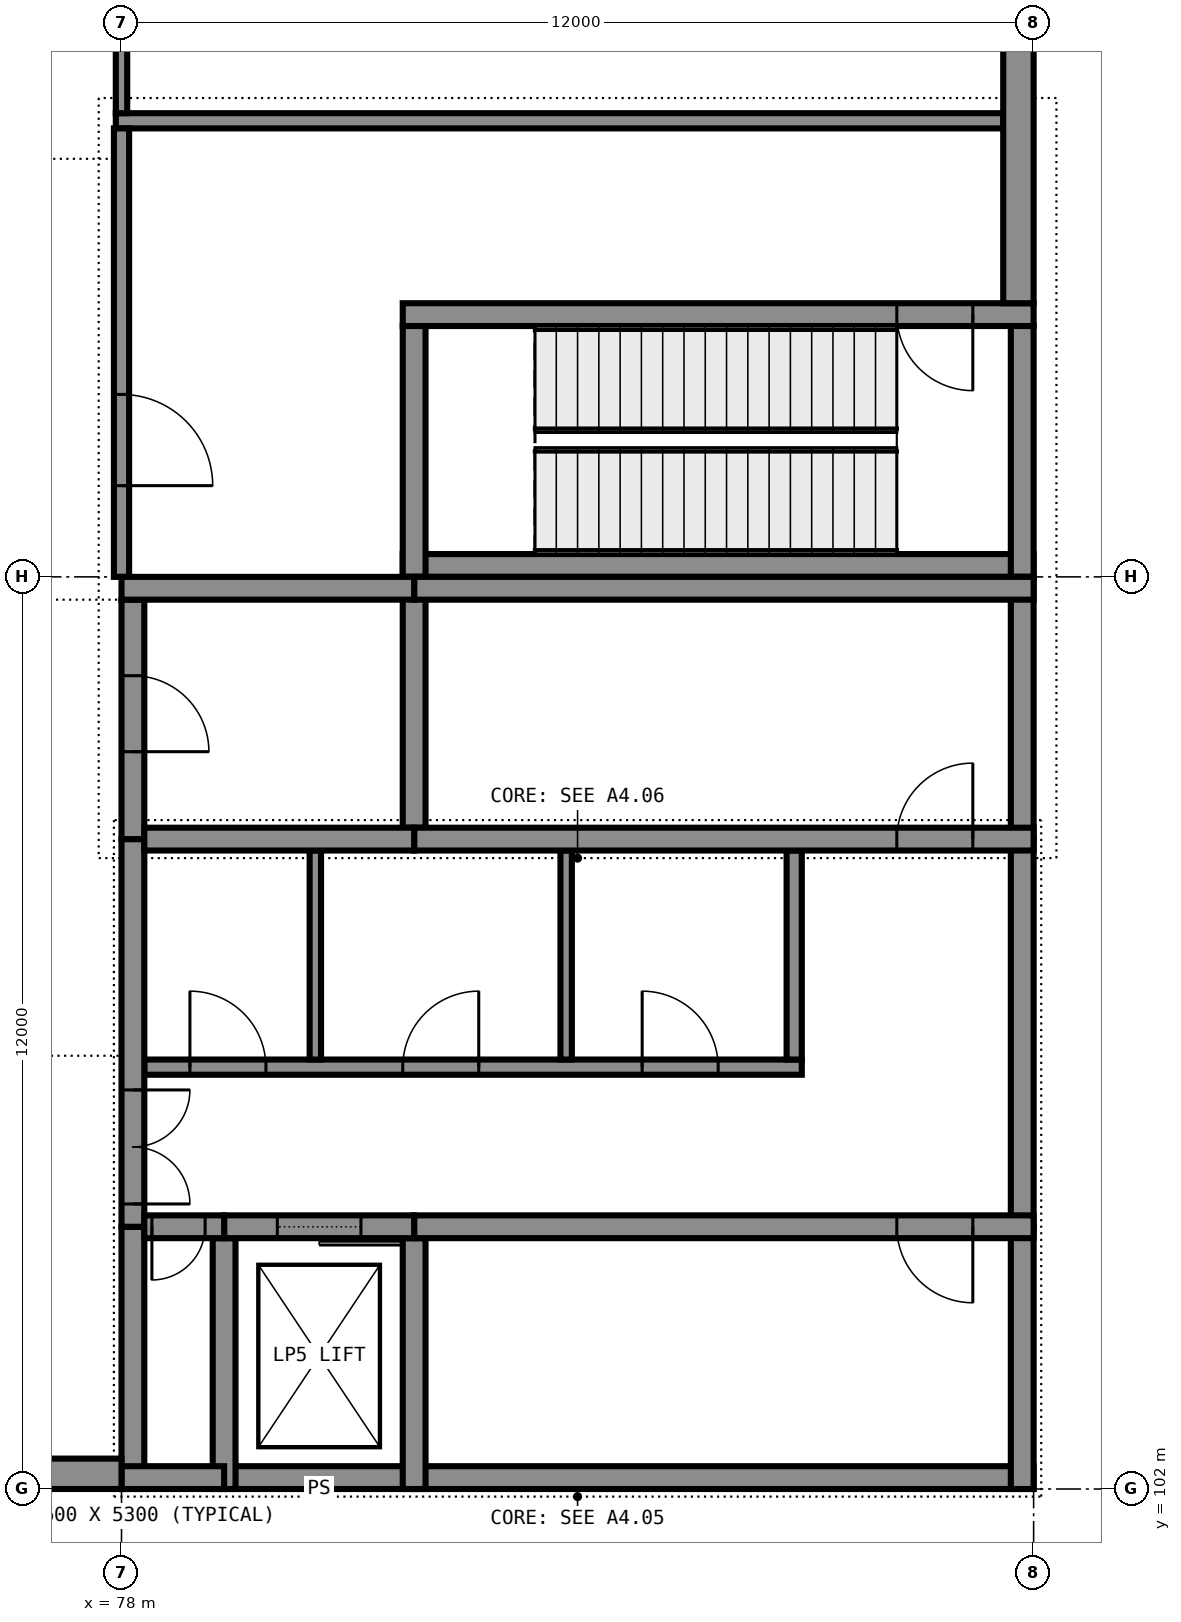
"""IFC4 building model, lengths in metres.
Left out: names, types, materials, properties, quantities, classifications, styles, units other than length and angle.
Written with IfcOpenShell. Run it as: python <this file> out.ifc"""

import sys

from ifc_helpers import new_model, si_unit, direction, frame, frame_2d, origin, place, context, subcontext, project, spatial, rectangle, extrude, element, fill, save


model = new_model("IFC4")
c1 = context("Model", 3, precision=1e-05, world=origin(), true_north=direction((0.0, 1.0)))
c2 = subcontext(c1, "Body", "Model", "MODEL_VIEW")
j1 = project(units=[si_unit("LENGTHUNIT", "METRE"), si_unit("PLANEANGLEUNIT", "RADIAN")], contexts=[c1])
p1 = place(None, origin())
s1 = spatial("IfcSite", under=j1, at=p1, CompositionType="ELEMENT")
p2 = place(p1, origin())
s2 = spatial("IfcBuilding", under=s1, at=p2, CompositionType="ELEMENT")
p3 = place(p2, frame((0.0, 0.0, -6.0)))
s3 = spatial("IfcBuildingStorey", under=s2, at=p3, CompositionType="ELEMENT", Elevation=-6.0)
p4 = place(p3, frame((90.0, 114.15, 0.0), z_axis=(0.0, 0.0, 1.0), x_axis=(-1.0, 0.0, 0.0)))
e1 = element("IfcWall", 1, at=p4, inside=s3, PredefinedType="SHEAR", context=c2, shape_type="SweptSolid", body=[
    extrude(rectangle(XDim=8.3, YDim=0.3, at=frame_2d((4.15, 0.0))), origin(), (0.0, 0.0, 1.0), 5.7),
])
p5 = place(p3, frame((90.0, 117.45, 0.0), z_axis=(0.0, 0.0, 1.0), x_axis=(-1.0, 0.0, 0.0)))
e2 = element("IfcWall", 2, at=p5, inside=s3, PredefinedType="SHEAR", context=c2, shape_type="SweptSolid", body=[
    extrude(rectangle(XDim=8.3, YDim=0.3, at=frame_2d((4.15, 0.0))), origin(), (0.0, 0.0, 1.0), 5.7),
])
p6 = place(p5, frame((0.8, 0.0, 0.0)))
e3 = element("IfcOpeningElement", 3, at=p6, cuts=e2, PredefinedType="OPENING", context=c2, shape_type="SweptSolid", body=[
    extrude(rectangle(XDim=1.0, YDim=2.1, at=frame_2d((0.5, 1.05))), frame((0.0, 0.16, 0.0), z_axis=(0.0, -1.0, 0.0), x_axis=(1.0, 0.0, 0.0)), (0.0, 0.0, 1.0), 0.32),
])
for number, where, z_axis, x_axis in (
    (4, (89.85, 114.0, 0.0), (0.0, 0.0, 1.0), (0.0, 1.0, 0.0)),
    (5, (81.85, 114.0, 0.0), (0.0, 0.0, 1.0), (0.0, 1.0, 0.0)),
):
    element("IfcWall", number, at=place(p3, frame(where, z_axis=z_axis, x_axis=x_axis)), inside=s3, PredefinedType="SHEAR", context=c2, shape_type="SweptSolid", body=[
        extrude(rectangle(XDim=3.3, YDim=0.3, at=frame_2d((1.65, 0.0))), origin(), (0.0, 0.0, 1.0), 5.7),
    ])
p7 = place(p3, frame((90.0, 102.15, 0.0), z_axis=(0.0, 0.0, 1.0), x_axis=(-1.0, 0.0, 0.0)))
e6 = element("IfcWall", 6, at=p7, inside=s3, PredefinedType="SHEAR", context=c2, shape_type="SweptSolid", body=[
    extrude(rectangle(XDim=8.15, YDim=0.3, at=frame_2d((4.075, 0.0))), origin(), (0.0, 0.0, 1.0), 5.7),
])
p8 = place(p3, frame((81.85, 102.15, 0.0), z_axis=(0.0, 0.0, 1.0), x_axis=(-1.0, 0.0, 0.0)))
e7 = element("IfcWall", 7, at=p8, inside=s3, PredefinedType="SHEAR", context=c2, shape_type="SweptSolid", body=[
    extrude(rectangle(XDim=2.5, YDim=0.3, at=frame_2d((1.25, 0.0))), origin(), (0.0, 0.0, 1.0), 5.7),
])
p9 = place(p3, frame((79.35, 102.15, 0.0), z_axis=(0.0, 0.0, 1.0), x_axis=(-1.0, 0.0, 0.0)))
e8 = element("IfcWall", 8, at=p9, inside=s3, PredefinedType="SHEAR", context=c2, shape_type="SweptSolid", body=[
    extrude(rectangle(XDim=1.35, YDim=0.3, at=frame_2d((0.675, 0.0))), origin(), (0.0, 0.0, 1.0), 5.7),
])
p10 = place(p3, frame((90.0, 113.85, 0.0), z_axis=(0.0, 0.0, 1.0), x_axis=(-1.0, 0.0, 0.0)))
e9 = element("IfcWall", 9, at=p10, inside=s3, PredefinedType="SHEAR", context=c2, shape_type="SweptSolid", body=[
    extrude(rectangle(XDim=8.15, YDim=0.3, at=frame_2d((4.075, 0.0))), origin(), (0.0, 0.0, 1.0), 5.7),
])
p11 = place(p3, frame((81.85, 113.85, 0.0), z_axis=(0.0, 0.0, 1.0), x_axis=(-1.0, 0.0, 0.0)))
e10 = element("IfcWall", 10, at=p11, inside=s3, PredefinedType="SHEAR", context=c2, shape_type="SweptSolid", body=[
    extrude(rectangle(XDim=3.85, YDim=0.3, at=frame_2d((1.925, 0.0))), origin(), (0.0, 0.0, 1.0), 5.7),
])
p12 = place(p3, frame((90.0, 105.45, 0.0), z_axis=(0.0, 0.0, 1.0), x_axis=(-1.0, 0.0, 0.0)))
e11 = element("IfcWall", 11, at=p12, inside=s3, PredefinedType="SHEAR", context=c2, shape_type="SweptSolid", body=[
    extrude(rectangle(XDim=8.15, YDim=0.3, at=frame_2d((4.075, 0.0))), origin(), (0.0, 0.0, 1.0), 5.7),
])
p13 = place(p12, frame((0.8, 0.0, 0.0)))
e12 = element("IfcOpeningElement", 12, at=p13, cuts=e11, PredefinedType="OPENING", context=c2, shape_type="SweptSolid", body=[
    extrude(rectangle(XDim=1.0, YDim=2.1, at=frame_2d((0.5, 1.05))), frame((0.0, 0.16, 0.0), z_axis=(0.0, -1.0, 0.0), x_axis=(1.0, 0.0, 0.0)), (0.0, 0.0, 1.0), 0.32),
])
p14 = place(p3, frame((81.85, 105.45, 0.0), z_axis=(0.0, 0.0, 1.0), x_axis=(-1.0, 0.0, 0.0)))
e13 = element("IfcWall", 13, at=p14, inside=s3, PredefinedType="SHEAR", context=c2, shape_type="SweptSolid", body=[
    extrude(rectangle(XDim=2.5, YDim=0.3, at=frame_2d((1.25, 0.0))), origin(), (0.0, 0.0, 1.0), 5.7),
])
p15 = place(p14, frame((0.7, 0.0, 0.0)))
e14 = element("IfcOpeningElement", 14, at=p15, cuts=e13, PredefinedType="OPENING", context=c2, shape_type="SweptSolid", body=[
    extrude(rectangle(XDim=1.1, YDim=2.1, at=frame_2d((0.55, 1.05))), frame((0.0, 0.16, 0.0), z_axis=(0.0, -1.0, 0.0), x_axis=(1.0, 0.0, 0.0)), (0.0, 0.0, 1.0), 0.32),
])
p16 = place(p3, frame((79.35, 105.45, 0.0), z_axis=(0.0, 0.0, 1.0), x_axis=(-1.0, 0.0, 0.0)))
e15 = element("IfcWall", 15, at=p16, inside=s3, PredefinedType="SHEAR", context=c2, shape_type="SweptSolid", body=[
    extrude(rectangle(XDim=1.05, YDim=0.3, at=frame_2d((0.525, 0.0))), origin(), (0.0, 0.0, 1.0), 5.7),
])
p17 = place(p16, frame((0.25, 0.0, 0.0)))
e16 = element("IfcOpeningElement", 16, at=p17, cuts=e15, PredefinedType="OPENING", context=c2, shape_type="SweptSolid", body=[
    extrude(rectangle(XDim=0.7, YDim=2.1, at=frame_2d((0.35, 1.05))), frame((0.0, 0.16, 0.0), z_axis=(0.0, -1.0, 0.0), x_axis=(1.0, 0.0, 0.0)), (0.0, 0.0, 1.0), 0.32),
])
p18 = place(p3, frame((90.0, 110.55, 0.0), z_axis=(0.0, 0.0, 1.0), x_axis=(-1.0, 0.0, 0.0)))
e17 = element("IfcWall", 17, at=p18, inside=s3, PredefinedType="SHEAR", context=c2, shape_type="SweptSolid", body=[
    extrude(rectangle(XDim=8.15, YDim=0.3, at=frame_2d((4.075, 0.0))), origin(), (0.0, 0.0, 1.0), 5.7),
])
p19 = place(p18, frame((0.8, 0.0, 0.0)))
e18 = element("IfcOpeningElement", 18, at=p19, cuts=e17, PredefinedType="OPENING", context=c2, shape_type="SweptSolid", body=[
    extrude(rectangle(XDim=1.0, YDim=2.1, at=frame_2d((0.5, 1.05))), frame((0.0, 0.16, 0.0), z_axis=(0.0, -1.0, 0.0), x_axis=(1.0, 0.0, 0.0)), (0.0, 0.0, 1.0), 0.32),
])
p20 = place(p3, frame((81.85, 110.55, 0.0), z_axis=(0.0, 0.0, 1.0), x_axis=(-1.0, 0.0, 0.0)))
e19 = element("IfcWall", 19, at=p20, inside=s3, PredefinedType="SHEAR", context=c2, shape_type="SweptSolid", body=[
    extrude(rectangle(XDim=3.55, YDim=0.3, at=frame_2d((1.775, 0.0))), origin(), (0.0, 0.0, 1.0), 5.7),
])
p21 = place(p3, frame((89.85, 102.0, 0.0), z_axis=(0.0, 0.0, 1.0), x_axis=(0.0, 1.0, 0.0)))
e20 = element("IfcWall", 20, at=p21, inside=s3, PredefinedType="SHEAR", context=c2, shape_type="SweptSolid", body=[
    extrude(rectangle(XDim=3.45, YDim=0.3, at=frame_2d((1.725, 0.0))), origin(), (0.0, 0.0, 1.0), 5.7),
])
p22 = place(p3, frame((89.85, 105.45, 0.0), z_axis=(0.0, 0.0, 1.0), x_axis=(0.0, 1.0, 0.0)))
e21 = element("IfcWall", 21, at=p22, inside=s3, PredefinedType="SHEAR", context=c2, shape_type="SweptSolid", body=[
    extrude(rectangle(XDim=5.1, YDim=0.3, at=frame_2d((2.55, 0.0))), origin(), (0.0, 0.0, 1.0), 5.7),
])
for number, where, z_axis, x_axis in (
    (22, (89.85, 110.55, 0.0), (0.0, 0.0, 1.0), (0.0, 1.0, 0.0)),
    (23, (78.15, 102.0, 0.0), (0.0, 0.0, 1.0), (0.0, 1.0, 0.0)),
):
    element("IfcWall", number, at=place(p3, frame(where, z_axis=z_axis, x_axis=x_axis)), inside=s3, PredefinedType="SHEAR", context=c2, shape_type="SweptSolid", body=[
        extrude(rectangle(XDim=3.45, YDim=0.3, at=frame_2d((1.725, 0.0))), origin(), (0.0, 0.0, 1.0), 5.7),
    ])
p23 = place(p3, frame((78.15, 105.45, 0.0), z_axis=(0.0, 0.0, 1.0), x_axis=(0.0, 1.0, 0.0)))
e24 = element("IfcWall", 24, at=p23, inside=s3, PredefinedType="SHEAR", context=c2, shape_type="SweptSolid", body=[
    extrude(rectangle(XDim=5.1, YDim=0.3, at=frame_2d((2.55, 0.0))), origin(), (0.0, 0.0, 1.0), 5.7),
])
p24 = place(p23, frame((0.3, 0.0, 0.0)))
e25 = element("IfcOpeningElement", 25, at=p24, cuts=e24, PredefinedType="OPENING", context=c2, shape_type="SweptSolid", body=[
    extrude(rectangle(XDim=1.5, YDim=2.1, at=frame_2d((0.75, 1.05))), frame((0.0, 0.16, 0.0), z_axis=(0.0, -1.0, 0.0), x_axis=(1.0, 0.0, 0.0)), (0.0, 0.0, 1.0), 0.32),
])
p25 = place(p3, frame((78.15, 110.55, 0.0), z_axis=(0.0, 0.0, 1.0), x_axis=(0.0, 1.0, 0.0)))
e26 = element("IfcWall", 26, at=p25, inside=s3, PredefinedType="SHEAR", context=c2, shape_type="SweptSolid", body=[
    extrude(rectangle(XDim=3.15, YDim=0.3, at=frame_2d((1.575, 0.0))), origin(), (0.0, 0.0, 1.0), 5.7),
])
p26 = place(p25, frame((1.15, 0.0, 0.0)))
e27 = element("IfcOpeningElement", 27, at=p26, cuts=e26, PredefinedType="OPENING", context=c2, shape_type="SweptSolid", body=[
    extrude(rectangle(XDim=1.0, YDim=2.1, at=frame_2d((0.5, 1.05))), frame((0.0, 0.16, 0.0), z_axis=(0.0, -1.0, 0.0), x_axis=(1.0, 0.0, 0.0)), (0.0, 0.0, 1.0), 0.32),
])
for number, where, z_axis, x_axis in (
    (28, (81.85, 102.0, 0.0), (0.0, 0.0, 1.0), (0.0, 1.0, 0.0)),
    (29, (81.85, 110.7, 0.0), (0.0, 0.0, 1.0), (0.0, 1.0, 0.0)),
    (30, (79.35, 102.0, 0.0), (0.0, 0.0, 1.0), (0.0, 1.0, 0.0)),
):
    element("IfcWall", number, at=place(p3, frame(where, z_axis=z_axis, x_axis=x_axis)), inside=s3, PredefinedType="SHEAR", context=c2, shape_type="SweptSolid", body=[
        extrude(rectangle(XDim=3.3, YDim=0.3, at=frame_2d((1.65, 0.0))), origin(), (0.0, 0.0, 1.0), 5.7),
    ])
p27 = place(p3, frame((66.5, 102.2, 0.0), z_axis=(0.0, 0.0, 1.0), x_axis=(1.0, 0.0, 0.0)))
e31 = element("IfcWall", 31, at=p27, inside=s3, PredefinedType="SOLIDWALL", context=c2, shape_type="SweptSolid", body=[
    extrude(rectangle(XDim=11.5, YDim=0.4, at=frame_2d((5.75, 0.0))), origin(), (0.0, 0.0, 1.0), 5.7),
])
p28 = place(p3, frame((89.8, 117.6, 0.0), z_axis=(0.0, 0.0, 1.0), x_axis=(0.0, 1.0, 0.0)))
e32 = element("IfcWall", 32, at=p28, inside=s3, PredefinedType="SOLIDWALL", context=c2, shape_type="SweptSolid", body=[
    extrude(rectangle(XDim=7.9, YDim=0.4, at=frame_2d((3.95, 0.0))), origin(), (0.0, 0.0, 1.0), 5.7),
])
p29 = place(p3, frame((78.3, 107.55, 0.0), z_axis=(0.0, 0.0, 1.0), x_axis=(1.0, 0.0, 0.0)))
e33 = element("IfcWall", 33, at=p29, inside=s3, PredefinedType="PARTITIONING", context=c2, shape_type="SweptSolid", body=[
    extrude(rectangle(XDim=8.65, YDim=0.2, at=frame_2d((4.325, 0.0))), origin(), (0.0, 0.0, 1.0), 5.7),
])
p30 = place(p29, frame((0.6, 0.0, 0.0)))
e34 = element("IfcOpeningElement", 34, at=p30, cuts=e33, PredefinedType="OPENING", context=c2, shape_type="SweptSolid", body=[
    extrude(rectangle(XDim=1.0, YDim=2.1, at=frame_2d((0.5, 1.05))), frame((0.0, 0.11, 0.0), z_axis=(0.0, -1.0, 0.0), x_axis=(1.0, 0.0, 0.0)), (0.0, 0.0, 1.0), 0.22),
])
p31 = place(p29, frame((3.4, 0.0, 0.0)))
e35 = element("IfcOpeningElement", 35, at=p31, cuts=e33, PredefinedType="OPENING", context=c2, shape_type="SweptSolid", body=[
    extrude(rectangle(XDim=1.0, YDim=2.1, at=frame_2d((0.5, 1.05))), frame((0.0, 0.11, 0.0), z_axis=(0.0, -1.0, 0.0), x_axis=(1.0, 0.0, 0.0)), (0.0, 0.0, 1.0), 0.22),
])
p32 = place(p29, frame((6.55, 0.0, 0.0)))
e36 = element("IfcOpeningElement", 36, at=p32, cuts=e33, PredefinedType="OPENING", context=c2, shape_type="SweptSolid", body=[
    extrude(rectangle(XDim=1.0, YDim=2.1, at=frame_2d((0.5, 1.05))), frame((0.0, 0.11, 0.0), z_axis=(0.0, -1.0, 0.0), x_axis=(1.0, 0.0, 0.0)), (0.0, 0.0, 1.0), 0.22),
])
p33 = place(p3, frame((77.925, 120.0, 0.0), z_axis=(0.0, 0.0, 1.0), x_axis=(1.0, 0.0, 0.0)))
e37 = element("IfcWall", 37, at=p33, inside=s3, PredefinedType="PARTITIONING", context=c2, shape_type="SweptSolid", body=[
    extrude(rectangle(XDim=11.675, YDim=0.2, at=frame_2d((5.837, 0.0))), origin(), (0.0, 0.0, 1.0), 5.7),
])
p34 = place(p3, frame((78.0, 114.0, 0.0), z_axis=(0.0, 0.0, 1.0), x_axis=(0.0, 1.0, 0.0)))
e38 = element("IfcWall", 38, at=p34, inside=s3, PredefinedType="PARTITIONING", context=c2, shape_type="SweptSolid", body=[
    extrude(rectangle(XDim=5.9, YDim=0.2, at=frame_2d((2.95, 0.0))), origin(), (0.0, 0.0, 1.0), 4.7),
])
p35 = place(p34, frame((1.2, 0.0, 0.0)))
e39 = element("IfcOpeningElement", 39, at=p35, cuts=e38, PredefinedType="OPENING", context=c2, shape_type="SweptSolid", body=[
    extrude(rectangle(XDim=1.2, YDim=2.1, at=frame_2d((0.6, 1.05))), frame((0.0, 0.11, 0.0), z_axis=(0.0, -1.0, 0.0), x_axis=(1.0, 0.0, 0.0)), (0.0, 0.0, 1.0), 0.22),
])
p36 = place(p3, frame((78.0, 120.1, 0.0), z_axis=(0.0, 0.0, 1.0), x_axis=(0.0, 1.0, 0.0)))
e40 = element("IfcWall", 40, at=p36, inside=s3, PredefinedType="PARTITIONING", context=c2, shape_type="SweptSolid", body=[
    extrude(rectangle(XDim=29.9, YDim=0.15, at=frame_2d((14.95, 0.0))), origin(), (0.0, 0.0, 1.0), 4.7),
])
p37 = place(p36, frame((13.15, 0.0, 0.0)))
e41 = element("IfcOpeningElement", 41, at=p37, cuts=e40, PredefinedType="OPENING", context=c2, shape_type="SweptSolid", body=[
    extrude(rectangle(XDim=3.5, YDim=2.1, at=frame_2d((1.75, 1.05))), frame((0.0, 0.085, 0.0), z_axis=(0.0, -1.0, 0.0), x_axis=(1.0, 0.0, 0.0)), (0.0, 0.0, 1.0), 0.17),
])
for number, where, z_axis, x_axis in (
    (42, (80.55, 107.65, 0.0), (0.0, 0.0, 1.0), (0.0, 1.0, 0.0)),
    (43, (83.85, 107.65, 0.0), (0.0, 0.0, 1.0), (0.0, 1.0, 0.0)),
):
    element("IfcWall", number, at=place(p3, frame(where, z_axis=z_axis, x_axis=x_axis)), inside=s3, PredefinedType="PARTITIONING", context=c2, shape_type="SweptSolid", body=[
        extrude(rectangle(XDim=2.75, YDim=0.15, at=frame_2d((1.375, 0.0))), origin(), (0.0, 0.0, 1.0), 5.7),
    ])
p38 = place(p3, frame((86.85, 107.65, 0.0), z_axis=(0.0, 0.0, 1.0), x_axis=(0.0, 1.0, 0.0)))
e44 = element("IfcWall", 44, at=p38, inside=s3, PredefinedType="PARTITIONING", context=c2, shape_type="SweptSolid", body=[
    extrude(rectangle(XDim=2.75, YDim=0.2, at=frame_2d((1.375, 0.0))), origin(), (0.0, 0.0, 1.0), 5.7),
])
p39 = place(p17, origin())
e45 = element("IfcDoor", 45, at=p39, inside=s3, OperationType="SINGLE_SWING_LEFT", PredefinedType="DOOR", context=c2, shape_type="SweptSolid", body=[
    extrude(rectangle(XDim=0.7, YDim=2.1, at=frame_2d((0.35, 1.05))), frame((0.0, 0.025, 0.0), z_axis=(0.0, -1.0, 0.0), x_axis=(1.0, 0.0, 0.0)), (0.0, 0.0, 1.0), 0.05),
])
fill(e16, e45)
p40 = place(p15, origin())
e46 = element("IfcDoor", 46, at=p40, inside=s3, OperationType="SLIDING_TO_LEFT", PredefinedType="DOOR", context=c2, shape_type="SweptSolid", body=[
    extrude(rectangle(XDim=1.1, YDim=2.1, at=frame_2d((0.55, 1.05))), frame((0.0, 0.025, 0.0), z_axis=(0.0, -1.0, 0.0), x_axis=(1.0, 0.0, 0.0)), (0.0, 0.0, 1.0), 0.05),
])
fill(e14, e46)
p41 = place(p13, origin())
e47 = element("IfcDoor", 47, at=p41, inside=s3, OperationType="SINGLE_SWING_RIGHT", PredefinedType="DOOR", context=c2, shape_type="SweptSolid", body=[
    extrude(rectangle(XDim=1.0, YDim=2.1, at=frame_2d((0.5, 1.05))), frame((0.0, 0.025, 0.0), z_axis=(0.0, -1.0, 0.0), x_axis=(1.0, 0.0, 0.0)), (0.0, 0.0, 1.0), 0.05),
])
fill(e12, e47)
p42 = place(p24, frame((1.5, 0.0, 0.0), z_axis=(0.0, 0.0, 1.0), x_axis=(-1.0, 0.0, 0.0)))
e48 = element("IfcDoor", 48, at=p42, inside=s3, OperationType="DOUBLE_DOOR_SINGLE_SWING", PredefinedType="DOOR", context=c2, shape_type="SweptSolid", body=[
    extrude(rectangle(XDim=1.5, YDim=2.1, at=frame_2d((0.75, 1.05))), frame((0.0, 0.025, 0.0), z_axis=(0.0, -1.0, 0.0), x_axis=(1.0, 0.0, 0.0)), (0.0, 0.0, 1.0), 0.05),
])
fill(e25, e48)
p43 = place(p30, origin())
e49 = element("IfcDoor", 49, at=p43, inside=s3, OperationType="SINGLE_SWING_RIGHT", PredefinedType="DOOR", context=c2, shape_type="SweptSolid", body=[
    extrude(rectangle(XDim=1.0, YDim=2.1, at=frame_2d((0.5, 1.05))), frame((0.0, 0.025, 0.0), z_axis=(0.0, -1.0, 0.0), x_axis=(1.0, 0.0, 0.0)), (0.0, 0.0, 1.0), 0.05),
])
fill(e34, e49)
p44 = place(p31, origin())
e50 = element("IfcDoor", 50, at=p44, inside=s3, OperationType="SINGLE_SWING_LEFT", PredefinedType="DOOR", context=c2, shape_type="SweptSolid", body=[
    extrude(rectangle(XDim=1.0, YDim=2.1, at=frame_2d((0.5, 1.05))), frame((0.0, 0.025, 0.0), z_axis=(0.0, -1.0, 0.0), x_axis=(1.0, 0.0, 0.0)), (0.0, 0.0, 1.0), 0.05),
])
fill(e35, e50)
p45 = place(p32, origin())
e51 = element("IfcDoor", 51, at=p45, inside=s3, OperationType="SINGLE_SWING_RIGHT", PredefinedType="DOOR", context=c2, shape_type="SweptSolid", body=[
    extrude(rectangle(XDim=1.0, YDim=2.1, at=frame_2d((0.5, 1.05))), frame((0.0, 0.025, 0.0), z_axis=(0.0, -1.0, 0.0), x_axis=(1.0, 0.0, 0.0)), (0.0, 0.0, 1.0), 0.05),
])
fill(e36, e51)
p46 = place(p19, frame((1.0, 0.0, 0.0), z_axis=(0.0, 0.0, 1.0), x_axis=(-1.0, 0.0, 0.0)))
e52 = element("IfcDoor", 52, at=p46, inside=s3, OperationType="SINGLE_SWING_LEFT", PredefinedType="DOOR", context=c2, shape_type="SweptSolid", body=[
    extrude(rectangle(XDim=1.0, YDim=2.1, at=frame_2d((0.5, 1.05))), frame((0.0, 0.025, 0.0), z_axis=(0.0, -1.0, 0.0), x_axis=(1.0, 0.0, 0.0)), (0.0, 0.0, 1.0), 0.05),
])
fill(e18, e52)
p47 = place(p26, frame((1.0, 0.0, 0.0), z_axis=(0.0, 0.0, 1.0), x_axis=(-1.0, 0.0, 0.0)))
e53 = element("IfcDoor", 53, at=p47, inside=s3, OperationType="SINGLE_SWING_LEFT", PredefinedType="DOOR", context=c2, shape_type="SweptSolid", body=[
    extrude(rectangle(XDim=1.0, YDim=2.1, at=frame_2d((0.5, 1.05))), frame((0.0, 0.025, 0.0), z_axis=(0.0, -1.0, 0.0), x_axis=(1.0, 0.0, 0.0)), (0.0, 0.0, 1.0), 0.05),
])
fill(e27, e53)
p48 = place(p35, frame((1.2, 0.0, 0.0), z_axis=(0.0, 0.0, 1.0), x_axis=(-1.0, 0.0, 0.0)))
e54 = element("IfcDoor", 54, at=p48, inside=s3, OperationType="SINGLE_SWING_LEFT", PredefinedType="DOOR", context=c2, shape_type="SweptSolid", body=[
    extrude(rectangle(XDim=1.2, YDim=2.1, at=frame_2d((0.6, 1.05))), frame((0.0, 0.025, 0.0), z_axis=(0.0, -1.0, 0.0), x_axis=(1.0, 0.0, 0.0)), (0.0, 0.0, 1.0), 0.05),
])
fill(e39, e54)
p49 = place(p6, origin())
e55 = element("IfcDoor", 55, at=p49, inside=s3, OperationType="SINGLE_SWING_RIGHT", PredefinedType="DOOR", context=c2, shape_type="SweptSolid", body=[
    extrude(rectangle(XDim=1.0, YDim=2.1, at=frame_2d((0.5, 1.05))), frame((0.0, 0.025, 0.0), z_axis=(0.0, -1.0, 0.0), x_axis=(1.0, 0.0, 0.0)), (0.0, 0.0, 1.0), 0.05),
])
fill(e3, e55)
save(model, sys.argv[1])
